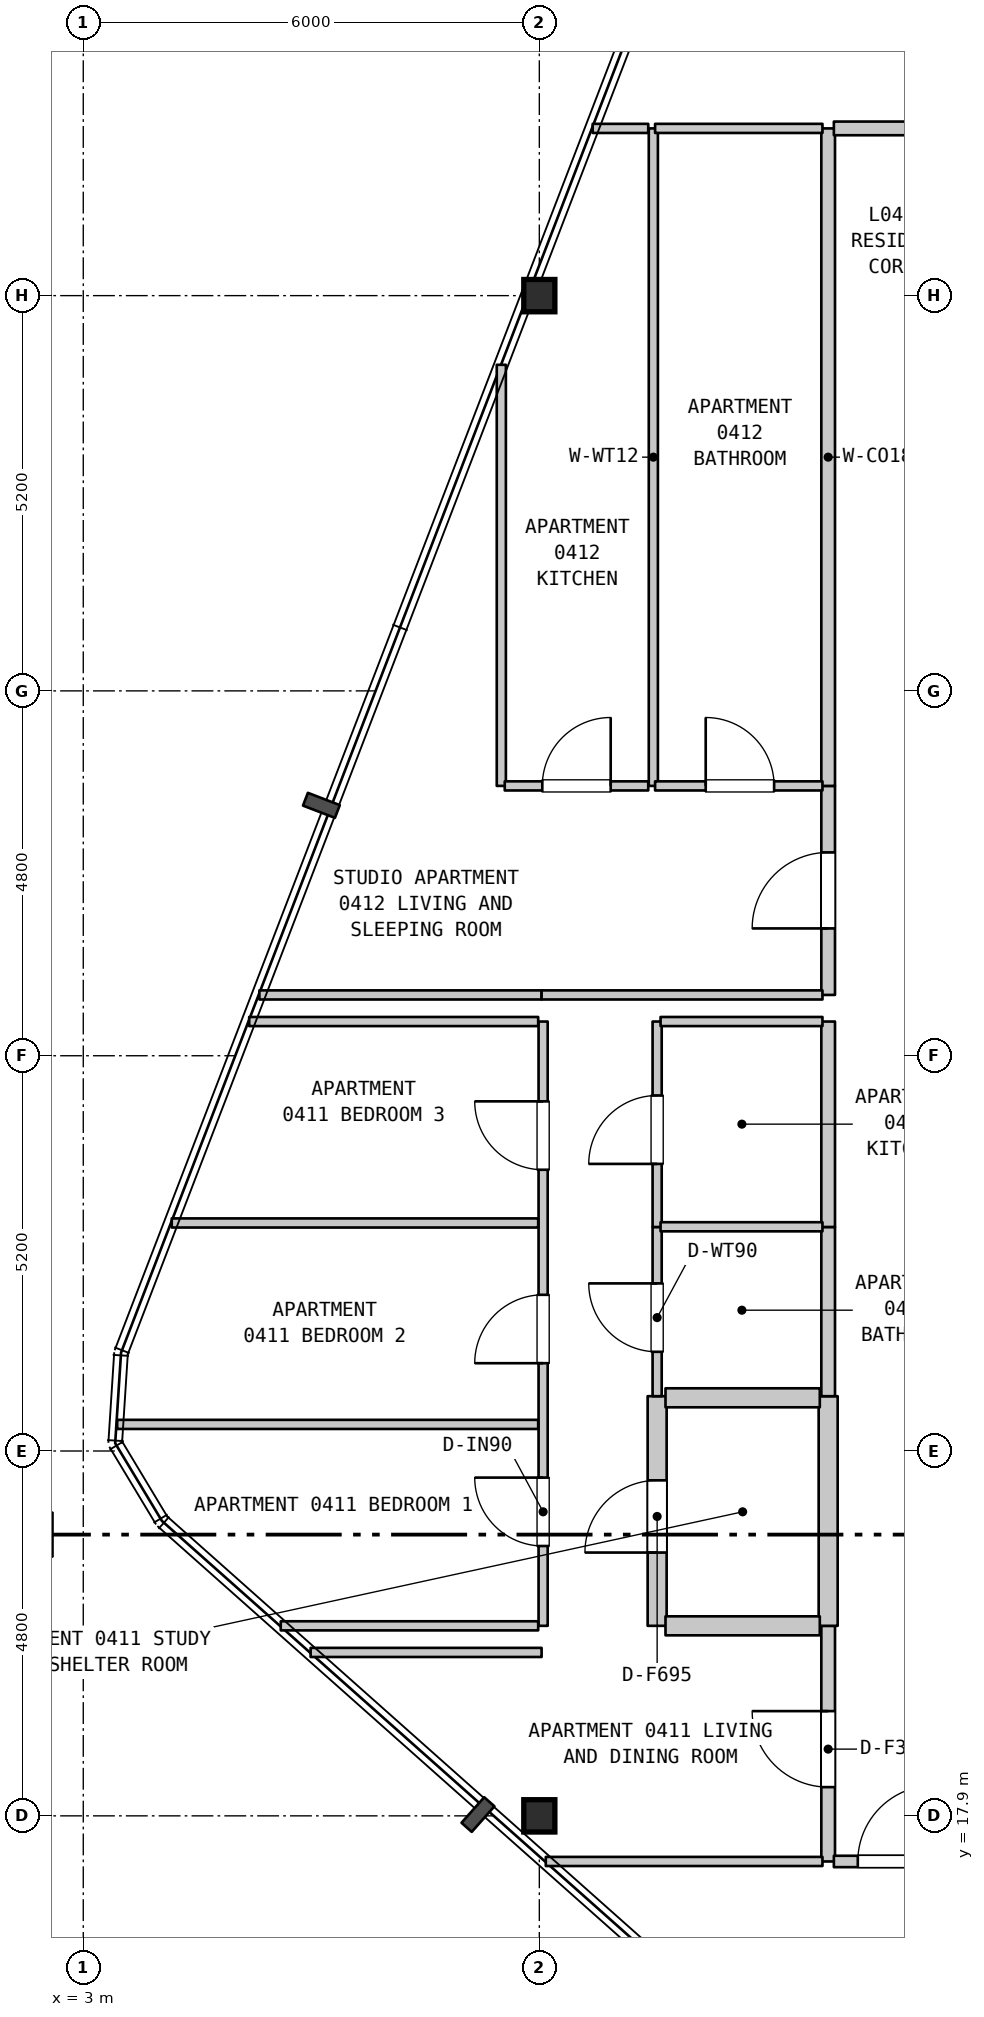
"""IFC4 building model, lengths in metres.
Left out: names, types, materials, properties, quantities, classifications, styles, units other than length and angle.
Written with IfcOpenShell. Run it as: python <this file> out.ifc"""

import sys

from ifc_helpers import new_model, si_unit, direction, frame, frame_2d, origin, origin_2d, place, context, subcontext, project, spatial, rectangle, i_section, extrude, element, fill, save


model = new_model("IFC4")
c1 = context("Model", 3, precision=1e-05, world=origin(), true_north=direction((0.0, 1.0)))
c2 = subcontext(c1, "Body", "Model", "MODEL_VIEW")
j1 = project(units=[si_unit("LENGTHUNIT", "METRE"), si_unit("PLANEANGLEUNIT", "RADIAN")], contexts=[c1])
p1 = place(None, origin())
s1 = spatial("IfcSite", under=j1, at=p1, CompositionType="ELEMENT")
p2 = place(p1, origin())
s2 = spatial("IfcBuilding", under=s1, at=p2, CompositionType="ELEMENT")
p3 = place(p2, frame((0.0, 0.0, 24.0)))
s3 = spatial("IfcBuildingStorey", under=s2, at=p3, CompositionType="ELEMENT", Elevation=24.0)
for number, where, z_axis, x_axis in (
    (1, (9.0, 17.9, 0.0), (0.0, 0.0, 1.0), (1.0, 0.0, 0.0)),
    (2, (9.0, 37.9, 0.0), (0.0, 0.0, 1.0), (1.0, 0.0, 0.0)),
):
    element("IfcColumn", number, at=place(p3, frame(where, z_axis=z_axis, x_axis=x_axis)), inside=s3, PredefinedType="COLUMN", context=c2, shape_type="SweptSolid", body=[
        extrude(i_section(OverallWidth=0.409, OverallDepth=0.425, WebThickness=0.032, FlangeThickness=0.052, FilletRadius=0.015, at=origin_2d()), origin(), (0.0, 0.0, 1.0), 3.7),
    ])
p4 = place(p3, frame((8.5, 31.45, 0.0), z_axis=(0.0, 0.0, 1.0), x_axis=(0.0, 1.0, 0.0)))
e3 = element("IfcWall", 3, at=p4, inside=s3, PredefinedType="PARTITIONING", context=c2, shape_type="SweptSolid", body=[
    extrude(rectangle(XDim=5.54, YDim=0.12, at=frame_2d((2.77, 0.0))), origin(), (0.0, 0.0, 1.0), 3.385),
])
p5 = place(p3, frame((9.05, 20.4, 0.0), z_axis=(0.0, 0.0, 1.0), x_axis=(0.0, 1.0, 0.0)))
e4 = element("IfcWall", 4, at=p5, inside=s3, PredefinedType="PARTITIONING", context=c2, shape_type="SweptSolid", body=[
    extrude(rectangle(XDim=7.95, YDim=0.12, at=frame_2d((3.975, 0.0))), origin(), (0.0, 0.0, 1.0), 2.785),
])
p6 = place(p5, frame((1.05, 0.0, 0.0)))
e5 = element("IfcOpeningElement", 5, at=p6, cuts=e4, PredefinedType="OPENING", context=c2, shape_type="SweptSolid", body=[
    extrude(rectangle(XDim=0.9, YDim=2.15, at=frame_2d((0.45, 1.075))), frame((0.0, 0.07, 0.0), z_axis=(0.0, -1.0, 0.0), x_axis=(1.0, 0.0, 0.0)), (0.0, 0.0, 1.0), 0.14),
])
p7 = place(p5, frame((3.455, 0.0, 0.0)))
e6 = element("IfcOpeningElement", 6, at=p7, cuts=e4, PredefinedType="OPENING", context=c2, shape_type="SweptSolid", body=[
    extrude(rectangle(XDim=0.9, YDim=2.15, at=frame_2d((0.45, 1.075))), frame((0.0, 0.07, 0.0), z_axis=(0.0, -1.0, 0.0), x_axis=(1.0, 0.0, 0.0)), (0.0, 0.0, 1.0), 0.14),
])
p8 = place(p5, frame((6.0, 0.0, 0.0)))
e7 = element("IfcOpeningElement", 7, at=p8, cuts=e4, PredefinedType="OPENING", context=c2, shape_type="SweptSolid", body=[
    extrude(rectangle(XDim=0.9, YDim=2.15, at=frame_2d((0.45, 1.075))), frame((0.0, 0.07, 0.0), z_axis=(0.0, -1.0, 0.0), x_axis=(1.0, 0.0, 0.0)), (0.0, 0.0, 1.0), 0.14),
])
p9 = place(p3, frame((10.5, 31.45, 0.0), z_axis=(0.0, 0.0, 1.0), x_axis=(0.0, 1.0, 0.0)))
e8 = element("IfcWall", 8, at=p9, inside=s3, PredefinedType="PARTITIONING", context=c2, shape_type="SweptSolid", body=[
    extrude(rectangle(XDim=8.65, YDim=0.12, at=frame_2d((4.325, 0.0))), origin(), (0.0, 0.0, 1.0), 3.385),
])
p10 = place(p3, frame((10.55, 20.4, 0.0), z_axis=(0.0, 0.0, 1.0), x_axis=(0.0, 1.0, 0.0)))
e9 = element("IfcWall", 9, at=p10, inside=s3, PredefinedType="STANDARD", context=c2, shape_type="SweptSolid", body=[
    extrude(rectangle(XDim=3.021, YDim=0.25, at=frame_2d((1.51, 0.0))), origin(), (0.0, 0.0, 1.0), 3.385),
])
p11 = place(p10, frame((0.964, 0.0, 0.0)))
e10 = element("IfcOpeningElement", 10, at=p11, cuts=e9, PredefinedType="OPENING", context=c2, shape_type="SweptSolid", body=[
    extrude(rectangle(XDim=0.95, YDim=2.15, at=frame_2d((0.475, 1.075))), frame((0.0, 0.135, 0.0), z_axis=(0.0, -1.0, 0.0), x_axis=(1.0, 0.0, 0.0)), (0.0, 0.0, 1.0), 0.27),
])
p12 = place(p3, frame((10.55, 23.421, 0.0), z_axis=(0.0, 0.0, 1.0), x_axis=(0.0, 1.0, 0.0)))
e11 = element("IfcWall", 11, at=p12, inside=s3, PredefinedType="PARTITIONING", context=c2, shape_type="SweptSolid", body=[
    extrude(rectangle(XDim=2.226, YDim=0.12, at=frame_2d((1.113, 0.0))), origin(), (0.0, 0.0, 1.0), 3.385),
])
p13 = place(p12, frame((0.584, 0.0, 0.0)))
e12 = element("IfcOpeningElement", 12, at=p13, cuts=e11, PredefinedType="OPENING", context=c2, shape_type="SweptSolid", body=[
    extrude(rectangle(XDim=0.9, YDim=2.1, at=frame_2d((0.45, 1.05))), frame((0.0, 0.07, 0.0), z_axis=(0.0, -1.0, 0.0), x_axis=(1.0, 0.0, 0.0)), (0.0, 0.0, 1.0), 0.14),
])
p14 = place(p3, frame((10.55, 25.647, 0.0), z_axis=(0.0, 0.0, 1.0), x_axis=(0.0, 1.0, 0.0)))
e13 = element("IfcWall", 13, at=p14, inside=s3, PredefinedType="PARTITIONING", context=c2, shape_type="SweptSolid", body=[
    extrude(rectangle(XDim=2.703, YDim=0.12, at=frame_2d((1.352, 0.0))), origin(), (0.0, 0.0, 1.0), 3.385),
])
p15 = place(p14, frame((0.83, 0.0, 0.0)))
e14 = element("IfcOpeningElement", 14, at=p15, cuts=e13, PredefinedType="OPENING", context=c2, shape_type="SweptSolid", body=[
    extrude(rectangle(XDim=0.9, YDim=2.15, at=frame_2d((0.45, 1.075))), frame((0.0, 0.07, 0.0), z_axis=(0.0, -1.0, 0.0), x_axis=(1.0, 0.0, 0.0)), (0.0, 0.0, 1.0), 0.14),
])
p16 = place(p3, frame((12.8, 17.3, 0.0), z_axis=(0.0, 0.0, 1.0), x_axis=(0.0, 1.0, 0.0)))
e15 = element("IfcWall", 15, at=p16, inside=s3, PredefinedType="STANDARD", context=c2, shape_type="SweptSolid", body=[
    extrude(rectangle(XDim=3.1, YDim=0.18, at=frame_2d((1.55, 0.0))), origin(), (0.0, 0.0, 1.0), 3.385),
])
p17 = place(p16, frame((0.978, 0.0, 0.0)))
e16 = element("IfcOpeningElement", 16, at=p17, cuts=e15, PredefinedType="OPENING", context=c2, shape_type="SweptSolid", body=[
    extrude(rectangle(XDim=1.0, YDim=2.15, at=frame_2d((0.5, 1.075))), frame((0.0, 0.1, 0.0), z_axis=(0.0, -1.0, 0.0), x_axis=(1.0, 0.0, 0.0)), (0.0, 0.0, 1.0), 0.2),
])
p18 = place(p3, frame((12.8, 20.4, 0.0), z_axis=(0.0, 0.0, 1.0), x_axis=(0.0, 1.0, 0.0)))
e17 = element("IfcWall", 17, at=p18, inside=s3, PredefinedType="STANDARD", context=c2, shape_type="SweptSolid", body=[
    extrude(rectangle(XDim=3.021, YDim=0.25, at=frame_2d((1.51, 0.0))), origin(), (0.0, 0.0, 1.0), 3.385),
])
p19 = place(p3, frame((12.8, 23.421, 0.0), z_axis=(0.0, 0.0, 1.0), x_axis=(0.0, 1.0, 0.0)))
e18 = element("IfcWall", 18, at=p19, inside=s3, PredefinedType="STANDARD", context=c2, shape_type="SweptSolid", body=[
    extrude(rectangle(XDim=2.226, YDim=0.18, at=frame_2d((1.113, 0.0))), origin(), (0.0, 0.0, 1.0), 3.385),
])
p20 = place(p3, frame((12.8, 25.647, 0.0), z_axis=(0.0, 0.0, 1.0), x_axis=(0.0, 1.0, 0.0)))
e19 = element("IfcWall", 19, at=p20, inside=s3, PredefinedType="STANDARD", context=c2, shape_type="SweptSolid", body=[
    extrude(rectangle(XDim=2.703, YDim=0.18, at=frame_2d((1.352, 0.0))), origin(), (0.0, 0.0, 1.0), 3.385),
])
p21 = place(p3, frame((12.8, 28.7, 0.0), z_axis=(0.0, 0.0, 1.0), x_axis=(0.0, 1.0, 0.0)))
e20 = element("IfcWall", 20, at=p21, inside=s3, PredefinedType="STANDARD", context=c2, shape_type="SweptSolid", body=[
    extrude(rectangle(XDim=2.75, YDim=0.18, at=frame_2d((1.375, 0.0))), origin(), (0.0, 0.0, 1.0), 3.385),
])
p22 = place(p21, frame((0.875, 0.0, 0.0)))
e21 = element("IfcOpeningElement", 21, at=p22, cuts=e20, PredefinedType="OPENING", context=c2, shape_type="SweptSolid", body=[
    extrude(rectangle(XDim=1.0, YDim=2.15, at=frame_2d((0.5, 1.075))), frame((0.0, 0.1, 0.0), z_axis=(0.0, -1.0, 0.0), x_axis=(1.0, 0.0, 0.0)), (0.0, 0.0, 1.0), 0.2),
])
p23 = place(p3, frame((12.8, 31.45, 0.0), z_axis=(0.0, 0.0, 1.0), x_axis=(0.0, 1.0, 0.0)))
e22 = element("IfcWall", 22, at=p23, inside=s3, PredefinedType="STANDARD", context=c2, shape_type="SweptSolid", body=[
    extrude(rectangle(XDim=8.65, YDim=0.18, at=frame_2d((4.325, 0.0))), origin(), (0.0, 0.0, 1.0), 3.385),
])
p24 = place(p3, frame((9.085, 17.3, 0.0), z_axis=(0.0, 0.0, 1.0), x_axis=(1.0, 0.0, 0.0)))
e23 = element("IfcWall", 23, at=p24, inside=s3, PredefinedType="PARTITIONING", context=c2, shape_type="SweptSolid", body=[
    extrude(rectangle(XDim=3.64, YDim=0.12, at=frame_2d((1.82, 0.0))), origin(), (0.0, 0.0, 1.0), 3.385),
])
p25 = place(p3, frame((12.875, 17.3, 0.0), z_axis=(0.0, 0.0, 1.0), x_axis=(1.0, 0.0, 0.0)))
e24 = element("IfcWall", 24, at=p25, inside=s3, PredefinedType="STANDARD", context=c2, shape_type="SweptSolid", body=[
    extrude(rectangle(XDim=2.33, YDim=0.15, at=frame_2d((1.165, 0.0))), origin(), (0.0, 0.0, 1.0), 3.385),
])
p26 = place(p25, frame((0.315, 0.0, 0.0)))
e25 = element("IfcOpeningElement", 25, at=p26, cuts=e24, PredefinedType="OPENING", context=c2, shape_type="SweptSolid", body=[
    extrude(rectangle(XDim=1.0, YDim=2.15, at=frame_2d((0.5, 1.075))), frame((0.0, 0.085, 0.0), z_axis=(0.0, -1.0, 0.0), x_axis=(1.0, 0.0, 0.0)), (0.0, 0.0, 1.0), 0.17),
])
p27 = place(p3, frame((5.991, 20.05, 0.0), z_axis=(0.0, 0.0, 1.0), x_axis=(1.0, 0.0, 0.0)))
e26 = element("IfcWall", 26, at=p27, inside=s3, PredefinedType="PARTITIONING", context=c2, shape_type="SweptSolid", body=[
    extrude(rectangle(XDim=3.039, YDim=0.12, at=frame_2d((1.52, 0.0))), origin(), (0.0, 0.0, 1.0), 3.385),
])
p28 = place(p3, frame((5.598, 20.4, 0.0), z_axis=(0.0, 0.0, 1.0), x_axis=(1.0, 0.0, 0.0)))
e27 = element("IfcWall", 27, at=p28, inside=s3, PredefinedType="PARTITIONING", context=c2, shape_type="SweptSolid", body=[
    extrude(rectangle(XDim=3.387, YDim=0.12, at=frame_2d((1.694, 0.0))), origin(), (0.0, 0.0, 1.0), 3.385),
])
p29 = place(p3, frame((10.66, 20.4, 0.0), z_axis=(0.0, 0.0, 1.0), x_axis=(1.0, 0.0, 0.0)))
e28 = element("IfcWall", 28, at=p29, inside=s3, PredefinedType="STANDARD", context=c2, shape_type="SweptSolid", body=[
    extrude(rectangle(XDim=2.03, YDim=0.25, at=frame_2d((1.015, 0.0))), origin(), (0.0, 0.0, 1.0), 3.385),
])
p30 = place(p3, frame((3.446, 23.05, 0.0), z_axis=(0.0, 0.0, 1.0), x_axis=(1.0, 0.0, 0.0)))
e29 = element("IfcWall", 29, at=p30, inside=s3, PredefinedType="PARTITIONING", context=c2, shape_type="SweptSolid", body=[
    extrude(rectangle(XDim=5.539, YDim=0.12, at=frame_2d((2.77, 0.0))), origin(), (0.0, 0.0, 1.0), 3.385),
])
p31 = place(p3, frame((10.66, 23.4, 0.0), z_axis=(0.0, 0.0, 1.0), x_axis=(1.0, 0.0, 0.0)))
e30 = element("IfcWall", 30, at=p31, inside=s3, PredefinedType="STANDARD", context=c2, shape_type="SweptSolid", body=[
    extrude(rectangle(XDim=2.03, YDim=0.25, at=frame_2d((1.015, 0.0))), origin(), (0.0, 0.0, 1.0), 3.385),
])
p32 = place(p3, frame((10.595, 25.65, 0.0), z_axis=(0.0, 0.0, 1.0), x_axis=(1.0, 0.0, 0.0)))
e31 = element("IfcWall", 31, at=p32, inside=s3, PredefinedType="PARTITIONING", context=c2, shape_type="SweptSolid", body=[
    extrude(rectangle(XDim=2.13, YDim=0.12, at=frame_2d((1.065, 0.0))), origin(), (0.0, 0.0, 1.0), 3.385),
])
p33 = place(p3, frame((4.164, 25.7, 0.0), z_axis=(0.0, 0.0, 1.0), x_axis=(1.0, 0.0, 0.0)))
e32 = element("IfcWall", 32, at=p33, inside=s3, PredefinedType="PARTITIONING", context=c2, shape_type="SweptSolid", body=[
    extrude(rectangle(XDim=4.821, YDim=0.12, at=frame_2d((2.411, 0.0))), origin(), (0.0, 0.0, 1.0), 3.385),
])
p34 = place(p3, frame((5.183, 28.35, 0.0), z_axis=(0.0, 0.0, 1.0), x_axis=(1.0, 0.0, 0.0)))
e33 = element("IfcWall", 33, at=p34, inside=s3, PredefinedType="PARTITIONING", context=c2, shape_type="SweptSolid", body=[
    extrude(rectangle(XDim=3.802, YDim=0.12, at=frame_2d((1.901, 0.0))), origin(), (0.0, 0.0, 1.0), 3.385),
])
p35 = place(p3, frame((10.595, 28.35, 0.0), z_axis=(0.0, 0.0, 1.0), x_axis=(1.0, 0.0, 0.0)))
e34 = element("IfcWall", 34, at=p35, inside=s3, PredefinedType="PARTITIONING", context=c2, shape_type="SweptSolid", body=[
    extrude(rectangle(XDim=2.13, YDim=0.12, at=frame_2d((1.065, 0.0))), origin(), (0.0, 0.0, 1.0), 3.385),
])
p36 = place(p3, frame((5.317, 28.7, 0.0), z_axis=(0.0, 0.0, 1.0), x_axis=(1.0, 0.0, 0.0)))
e35 = element("IfcWall", 35, at=p36, inside=s3, PredefinedType="PARTITIONING", context=c2, shape_type="SweptSolid", body=[
    extrude(rectangle(XDim=3.713, YDim=0.12, at=frame_2d((1.856, 0.0))), origin(), (0.0, 0.0, 1.0), 3.385),
])
p37 = place(p3, frame((9.03, 28.7, 0.0), z_axis=(0.0, 0.0, 1.0), x_axis=(1.0, 0.0, 0.0)))
e36 = element("IfcWall", 36, at=p37, inside=s3, PredefinedType="PARTITIONING", context=c2, shape_type="SweptSolid", body=[
    extrude(rectangle(XDim=3.695, YDim=0.12, at=frame_2d((1.848, 0.0))), origin(), (0.0, 0.0, 1.0), 3.385),
])
p38 = place(p3, frame((8.545, 31.45, 0.0), z_axis=(0.0, 0.0, 1.0), x_axis=(1.0, 0.0, 0.0)))
e37 = element("IfcWall", 37, at=p38, inside=s3, PredefinedType="PARTITIONING", context=c2, shape_type="SweptSolid", body=[
    extrude(rectangle(XDim=1.888, YDim=0.12, at=frame_2d((0.944, 0.0))), origin(), (0.0, 0.0, 1.0), 3.385),
])
p39 = place(p38, frame((0.494, 0.0, 0.0)))
e38 = element("IfcOpeningElement", 38, at=p39, cuts=e37, PredefinedType="OPENING", context=c2, shape_type="SweptSolid", body=[
    extrude(rectangle(XDim=0.9, YDim=2.15, at=frame_2d((0.45, 1.075))), frame((0.0, 0.07, 0.0), z_axis=(0.0, -1.0, 0.0), x_axis=(1.0, 0.0, 0.0)), (0.0, 0.0, 1.0), 0.14),
])
p40 = place(p3, frame((10.523, 31.45, 0.0), z_axis=(0.0, 0.0, 1.0), x_axis=(1.0, 0.0, 0.0)))
e39 = element("IfcWall", 39, at=p40, inside=s3, PredefinedType="PARTITIONING", context=c2, shape_type="SweptSolid", body=[
    extrude(rectangle(XDim=2.202, YDim=0.12, at=frame_2d((1.101, 0.0))), origin(), (0.0, 0.0, 1.0), 3.385),
])
p41 = place(p40, frame((0.666, 0.0, 0.0)))
e40 = element("IfcOpeningElement", 40, at=p41, cuts=e39, PredefinedType="OPENING", context=c2, shape_type="SweptSolid", body=[
    extrude(rectangle(XDim=0.9, YDim=2.1, at=frame_2d((0.45, 1.05))), frame((0.0, 0.07, 0.0), z_axis=(0.0, -1.0, 0.0), x_axis=(1.0, 0.0, 0.0)), (0.0, 0.0, 1.0), 0.14),
])
p42 = place(p3, frame((9.702, 40.1, 0.0), z_axis=(0.0, 0.0, 1.0), x_axis=(1.0, 0.0, 0.0)))
e41 = element("IfcWall", 41, at=p42, inside=s3, PredefinedType="PARTITIONING", context=c2, shape_type="SweptSolid", body=[
    extrude(rectangle(XDim=0.731, YDim=0.12, at=frame_2d((0.366, 0.0))), origin(), (0.0, 0.0, 1.0), 3.385),
])
p43 = place(p3, frame((10.523, 40.1, 0.0), z_axis=(0.0, 0.0, 1.0), x_axis=(1.0, 0.0, 0.0)))
e42 = element("IfcWall", 42, at=p43, inside=s3, PredefinedType="PARTITIONING", context=c2, shape_type="SweptSolid", body=[
    extrude(rectangle(XDim=2.202, YDim=0.12, at=frame_2d((1.101, 0.0))), origin(), (0.0, 0.0, 1.0), 3.385),
])
p44 = place(p3, frame((12.875, 40.1, 0.0), z_axis=(0.0, 0.0, 1.0), x_axis=(1.0, 0.0, 0.0)))
e43 = element("IfcWall", 43, at=p44, inside=s3, PredefinedType="STANDARD", context=c2, shape_type="SweptSolid", body=[
    extrude(rectangle(XDim=1.83, YDim=0.18, at=frame_2d((0.915, 0.0))), origin(), (0.0, 0.0, 1.0), 3.385),
])
p45 = place(p6, origin())
e44 = element("IfcDoor", 44, at=p45, inside=s3, OperationType="SINGLE_SWING_RIGHT", PredefinedType="DOOR", context=c2, shape_type="SweptSolid", body=[
    extrude(rectangle(XDim=0.9, YDim=2.15, at=frame_2d((0.45, 1.075))), frame((0.0, 0.025, 0.0), z_axis=(0.0, -1.0, 0.0), x_axis=(1.0, 0.0, 0.0)), (0.0, 0.0, 1.0), 0.05),
])
fill(e5, e44)
p46 = place(p7, origin())
e45 = element("IfcDoor", 45, at=p46, inside=s3, OperationType="SINGLE_SWING_LEFT", PredefinedType="DOOR", context=c2, shape_type="SweptSolid", body=[
    extrude(rectangle(XDim=0.9, YDim=2.15, at=frame_2d((0.45, 1.075))), frame((0.0, 0.025, 0.0), z_axis=(0.0, -1.0, 0.0), x_axis=(1.0, 0.0, 0.0)), (0.0, 0.0, 1.0), 0.05),
])
fill(e6, e45)
p47 = place(p8, origin())
e46 = element("IfcDoor", 46, at=p47, inside=s3, OperationType="SINGLE_SWING_RIGHT", PredefinedType="DOOR", context=c2, shape_type="SweptSolid", body=[
    extrude(rectangle(XDim=0.9, YDim=2.15, at=frame_2d((0.45, 1.075))), frame((0.0, 0.025, 0.0), z_axis=(0.0, -1.0, 0.0), x_axis=(1.0, 0.0, 0.0)), (0.0, 0.0, 1.0), 0.05),
])
fill(e7, e46)
p48 = place(p11, origin())
e47 = element("IfcDoor", 47, at=p48, inside=s3, OperationType="SINGLE_SWING_LEFT", PredefinedType="DOOR", context=c2, shape_type="SweptSolid", body=[
    extrude(rectangle(XDim=0.95, YDim=2.15, at=frame_2d((0.475, 1.075))), frame((0.0, 0.025, 0.0), z_axis=(0.0, -1.0, 0.0), x_axis=(1.0, 0.0, 0.0)), (0.0, 0.0, 1.0), 0.05),
])
fill(e10, e47)
p49 = place(p13, origin())
e48 = element("IfcDoor", 48, at=p49, inside=s3, OperationType="SINGLE_SWING_RIGHT", PredefinedType="DOOR", context=c2, shape_type="SweptSolid", body=[
    extrude(rectangle(XDim=0.9, YDim=2.1, at=frame_2d((0.45, 1.05))), frame((0.0, 0.025, 0.0), z_axis=(0.0, -1.0, 0.0), x_axis=(1.0, 0.0, 0.0)), (0.0, 0.0, 1.0), 0.05),
])
fill(e12, e48)
p50 = place(p15, origin())
e49 = element("IfcDoor", 49, at=p50, inside=s3, OperationType="SINGLE_SWING_LEFT", PredefinedType="DOOR", context=c2, shape_type="SweptSolid", body=[
    extrude(rectangle(XDim=0.9, YDim=2.15, at=frame_2d((0.45, 1.075))), frame((0.0, 0.025, 0.0), z_axis=(0.0, -1.0, 0.0), x_axis=(1.0, 0.0, 0.0)), (0.0, 0.0, 1.0), 0.05),
])
fill(e14, e49)
p51 = place(p17, origin())
e50 = element("IfcDoor", 50, at=p51, inside=s3, OperationType="SINGLE_SWING_RIGHT", PredefinedType="DOOR", context=c2, shape_type="SweptSolid", body=[
    extrude(rectangle(XDim=1.0, YDim=2.15, at=frame_2d((0.5, 1.075))), frame((0.0, 0.025, 0.0), z_axis=(0.0, -1.0, 0.0), x_axis=(1.0, 0.0, 0.0)), (0.0, 0.0, 1.0), 0.05),
])
fill(e16, e50)
p52 = place(p22, origin())
e51 = element("IfcDoor", 51, at=p52, inside=s3, OperationType="SINGLE_SWING_LEFT", PredefinedType="DOOR", context=c2, shape_type="SweptSolid", body=[
    extrude(rectangle(XDim=1.0, YDim=2.15, at=frame_2d((0.5, 1.075))), frame((0.0, 0.025, 0.0), z_axis=(0.0, -1.0, 0.0), x_axis=(1.0, 0.0, 0.0)), (0.0, 0.0, 1.0), 0.05),
])
fill(e21, e51)
p53 = place(p26, origin())
e52 = element("IfcDoor", 52, at=p53, inside=s3, OperationType="SINGLE_SWING_RIGHT", PredefinedType="DOOR", context=c2, shape_type="SweptSolid", body=[
    extrude(rectangle(XDim=1.0, YDim=2.15, at=frame_2d((0.5, 1.075))), frame((0.0, 0.025, 0.0), z_axis=(0.0, -1.0, 0.0), x_axis=(1.0, 0.0, 0.0)), (0.0, 0.0, 1.0), 0.05),
])
fill(e25, e52)
p54 = place(p39, origin())
e53 = element("IfcDoor", 53, at=p54, inside=s3, OperationType="SINGLE_SWING_RIGHT", PredefinedType="DOOR", context=c2, shape_type="SweptSolid", body=[
    extrude(rectangle(XDim=0.9, YDim=2.15, at=frame_2d((0.45, 1.075))), frame((0.0, 0.025, 0.0), z_axis=(0.0, -1.0, 0.0), x_axis=(1.0, 0.0, 0.0)), (0.0, 0.0, 1.0), 0.05),
])
fill(e38, e53)
p55 = place(p41, origin())
e54 = element("IfcDoor", 54, at=p55, inside=s3, OperationType="SINGLE_SWING_LEFT", PredefinedType="DOOR", context=c2, shape_type="SweptSolid", body=[
    extrude(rectangle(XDim=0.9, YDim=2.1, at=frame_2d((0.45, 1.05))), frame((0.0, 0.025, 0.0), z_axis=(0.0, -1.0, 0.0), x_axis=(1.0, 0.0, 0.0)), (0.0, 0.0, 1.0), 0.05),
])
fill(e40, e54)
save(model, sys.argv[1])
